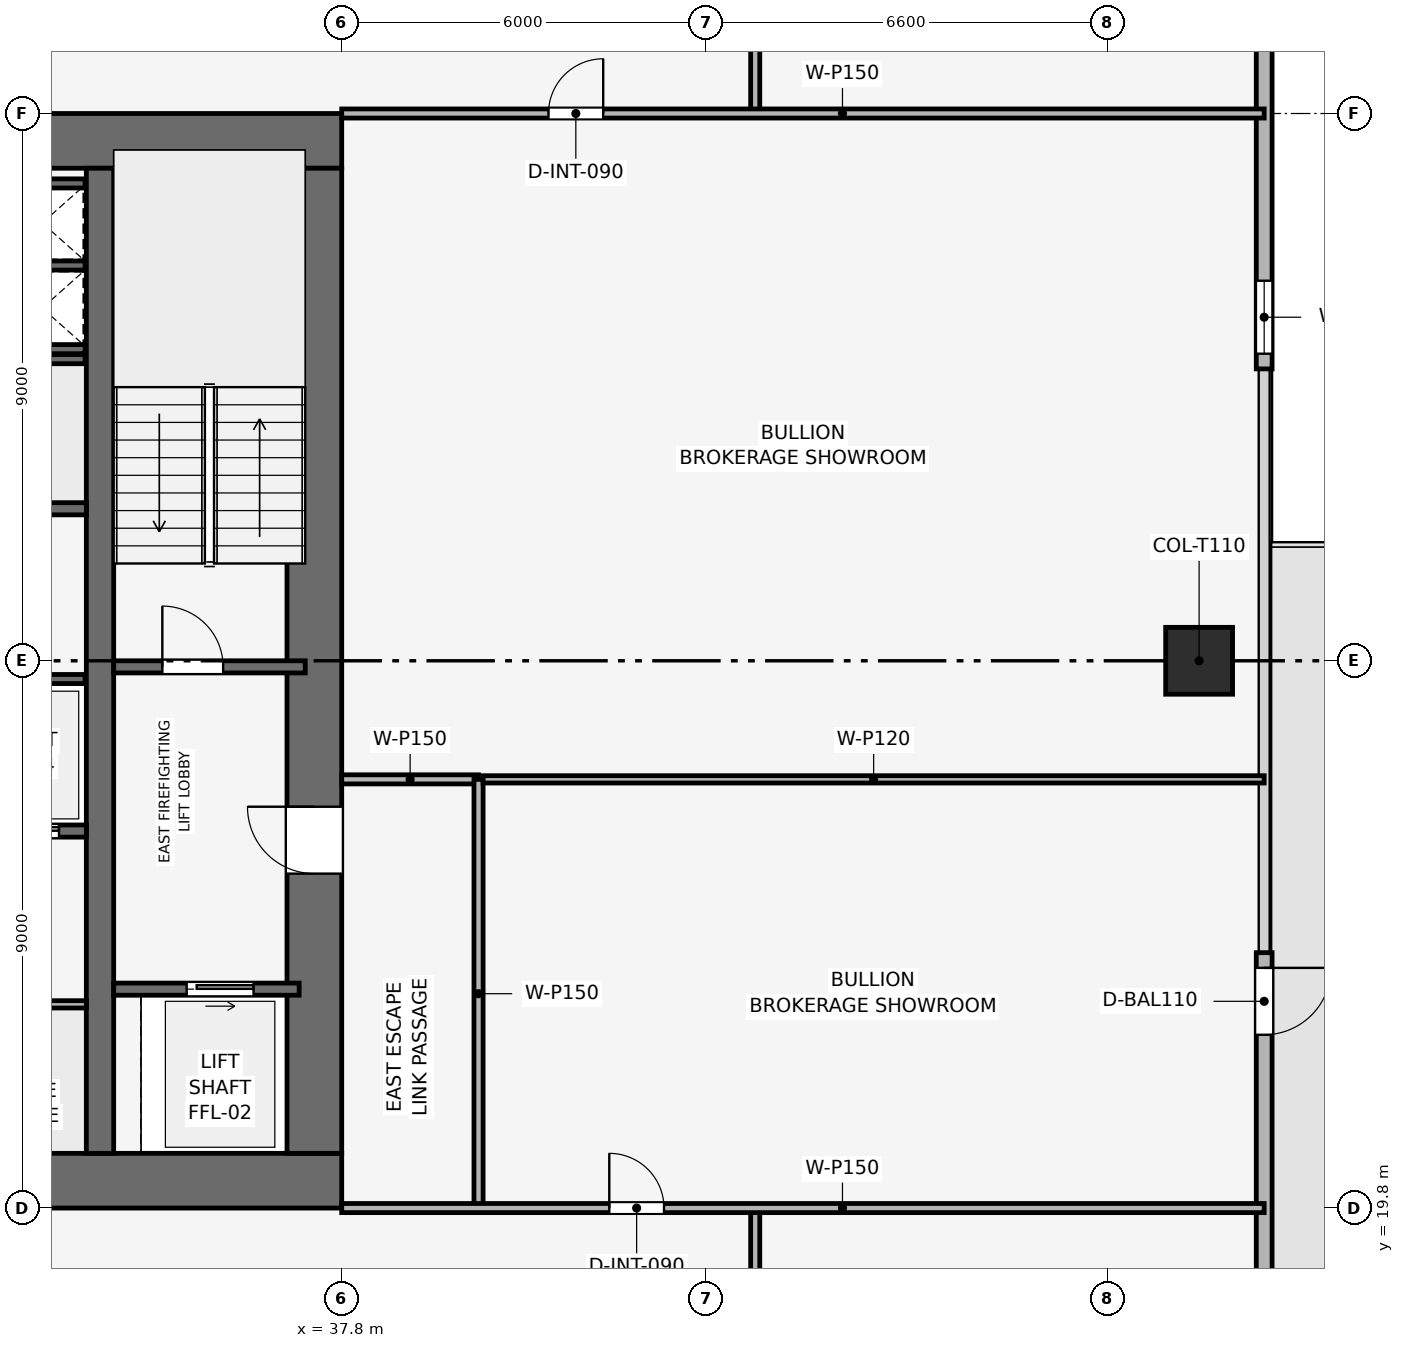
"""IFC4 building model, lengths in metres.
Left out: names, types, materials, properties, quantities, classifications, styles, units other than length and angle.
Written with IfcOpenShell. Run it as: python <this file> out.ifc"""

import sys

from ifc_helpers import new_model, si_unit, direction, frame, frame_2d, origin, origin_2d, place, context, subcontext, project, spatial, rectangle, extrude, element, fill, save


model = new_model("IFC4")
c1 = context("Model", 3, precision=1e-05, world=origin(), true_north=direction((0.0, 1.0)))
c2 = subcontext(c1, "Body", "Model", "MODEL_VIEW")
j1 = project(units=[si_unit("LENGTHUNIT", "METRE"), si_unit("PLANEANGLEUNIT", "RADIAN")], contexts=[c1])
p1 = place(None, origin())
s1 = spatial("IfcSite", under=j1, at=p1, CompositionType="ELEMENT")
p2 = place(p1, origin())
s2 = spatial("IfcBuilding", under=s1, at=p2, CompositionType="ELEMENT")
p3 = place(p2, frame((0.0, 0.0, 183.3)))
s3 = spatial("IfcBuildingStorey", under=s2, at=p3, CompositionType="ELEMENT", Elevation=183.3)
p4 = place(p3, frame((19.8, 20.25, 0.0), z_axis=(0.0, 0.0, 1.0), x_axis=(1.0, 0.0, 0.0)))
e1 = element("IfcWall", 1, at=p4, inside=s3, PredefinedType="SHEAR", context=c2, shape_type="SweptSolid", body=[
    extrude(rectangle(XDim=18.0, YDim=0.9, at=frame_2d((9.0, 0.0))), origin(), (0.0, 0.0, 1.0), 3.75),
])
p5 = place(p4, frame((8.4, 0.0, 0.0)))
e2 = element("IfcOpeningElement", 2, at=p5, cuts=e1, PredefinedType="OPENING", context=c2, shape_type="SweptSolid", body=[
    extrude(rectangle(XDim=1.2, YDim=2.2, at=frame_2d((0.6, 1.1))), frame((0.0, 0.46, 0.0), z_axis=(0.0, -1.0, 0.0), x_axis=(1.0, 0.0, 0.0)), (0.0, 0.0, 1.0), 0.92),
])
p6 = place(p3, frame((19.8, 37.35, 0.0), z_axis=(0.0, 0.0, 1.0), x_axis=(1.0, 0.0, 0.0)))
e3 = element("IfcWall", 3, at=p6, inside=s3, PredefinedType="SHEAR", context=c2, shape_type="SweptSolid", body=[
    extrude(rectangle(XDim=18.0, YDim=0.9, at=frame_2d((9.0, 0.0))), origin(), (0.0, 0.0, 1.0), 3.75),
])
p7 = place(p6, frame((7.05, 0.0, 0.0)))
e4 = element("IfcOpeningElement", 4, at=p7, cuts=e3, PredefinedType="OPENING", context=c2, shape_type="SweptSolid", body=[
    extrude(rectangle(XDim=1.1, YDim=2.15, at=frame_2d((0.55, 1.075))), frame((0.0, 0.46, 0.0), z_axis=(0.0, -1.0, 0.0), x_axis=(1.0, 0.0, 0.0)), (0.0, 0.0, 1.0), 0.92),
])
p8 = place(p3, frame((37.35, 20.7, 0.0), z_axis=(0.0, 0.0, 1.0), x_axis=(0.0, 1.0, 0.0)))
e5 = element("IfcWall", 5, at=p8, inside=s3, PredefinedType="SHEAR", context=c2, shape_type="SweptSolid", body=[
    extrude(rectangle(XDim=16.2, YDim=0.9, at=frame_2d((8.1, 0.0))), origin(), (0.0, 0.0, 1.0), 3.75),
])
p9 = place(p8, frame((4.6, 0.0, 0.0)))
e6 = element("IfcOpeningElement", 6, at=p9, cuts=e5, PredefinedType="OPENING", context=c2, shape_type="SweptSolid", body=[
    extrude(rectangle(XDim=1.1, YDim=2.15, at=frame_2d((0.55, 1.075))), frame((0.0, 0.46, 0.0), z_axis=(0.0, -1.0, 0.0), x_axis=(1.0, 0.0, 0.0)), (0.0, 0.0, 1.0), 0.92),
])
p10 = place(p3, frame((33.825, 20.7, 0.0), z_axis=(0.0, 0.0, 1.0), x_axis=(0.0, 1.0, 0.0)))
e7 = element("IfcWall", 7, at=p10, inside=s3, PredefinedType="SHEAR", context=c2, shape_type="SweptSolid", body=[
    extrude(rectangle(XDim=16.2, YDim=0.45, at=frame_2d((8.1, 0.0))), origin(), (0.0, 0.0, 1.0), 3.75),
])
p11 = place(p3, frame((51.9, 28.8, 0.003), z_axis=(0.0, 0.0, 1.0), x_axis=(1.0, 0.0, 0.0)))
e8 = element("IfcColumn", 8, at=p11, inside=s3, PredefinedType="COLUMN", context=c2, shape_type="SweptSolid", body=[
    extrude(rectangle(XDim=1.1, YDim=1.1, at=origin_2d()), origin(), (0.0, 0.0, 1.0), 3.489),
])
p12 = place(p3, frame((52.97, 46.2, 0.0), z_axis=(0.0, 0.0, 1.0), x_axis=(0.0, -1.0, 0.0)))
e9 = element("IfcWall", 9, at=p12, inside=s3, PredefinedType="SOLIDWALL", context=c2, shape_type="SweptSolid", body=[
    extrude(rectangle(XDim=12.6, YDim=0.26, at=frame_2d((6.3, 0.0))), origin(), (0.0, 0.0, 1.0), 3.495),
])
p13 = place(p12, frame((11.15, 0.0, 0.9)))
e10 = element("IfcOpeningElement", 10, at=p13, cuts=e9, PredefinedType="OPENING", context=c2, shape_type="SweptSolid", body=[
    extrude(rectangle(XDim=1.2, YDim=2.1, at=frame_2d((0.6, 1.05))), frame((0.0, 0.14, 0.0), z_axis=(0.0, -1.0, 0.0), x_axis=(1.0, 0.0, 0.0)), (0.0, 0.0, 1.0), 0.28),
])
p14 = place(p3, frame((52.97, 24.0, 0.0), z_axis=(0.0, 0.0, 1.0), x_axis=(0.0, -1.0, 0.0)))
e11 = element("IfcWall", 11, at=p14, inside=s3, PredefinedType="SOLIDWALL", context=c2, shape_type="SweptSolid", body=[
    extrude(rectangle(XDim=12.6, YDim=0.26, at=frame_2d((6.3, 0.0))), origin(), (0.0, 0.0, 1.0), 3.495),
])
p15 = place(p14, frame((0.25, 0.0, 0.0)))
e12 = element("IfcOpeningElement", 12, at=p15, cuts=e11, PredefinedType="OPENING", context=c2, shape_type="SweptSolid", body=[
    extrude(rectangle(XDim=1.1, YDim=2.2, at=frame_2d((0.55, 1.1))), frame((0.0, 0.14, 0.0), z_axis=(0.0, -1.0, 0.0), x_axis=(1.0, 0.0, 0.0)), (0.0, 0.0, 1.0), 0.28),
])
p16 = place(p3, frame((34.05, 28.7, 0.0), z_axis=(0.0, 0.0, 1.0), x_axis=(1.0, 0.0, 0.0)))
e13 = element("IfcWall", 13, at=p16, inside=s3, PredefinedType="SHEAR", context=c2, shape_type="SweptSolid", body=[
    extrude(rectangle(XDim=3.15, YDim=0.2, at=frame_2d((1.575, 0.0))), origin(), (0.0, 0.0, 1.0), 3.495),
])
p17 = place(p16, frame((0.8, 0.0, 0.0)))
e14 = element("IfcOpeningElement", 14, at=p17, cuts=e13, PredefinedType="OPENING", context=c2, shape_type="SweptSolid", body=[
    extrude(rectangle(XDim=1.0, YDim=2.1, at=frame_2d((0.5, 1.05))), frame((0.0, 0.11, 0.0), z_axis=(0.0, -1.0, 0.0), x_axis=(1.0, 0.0, 0.0)), (0.0, 0.0, 1.0), 0.22),
])
for number, where, z_axis, x_axis in (
    (15, (32.25, 33.925, 0.0), (0.0, 0.0, 1.0), (1.0, 0.0, 0.0)),
    (16, (32.25, 35.3, 0.0), (0.0, 0.0, 1.0), (1.0, 0.0, 0.0)),
):
    element("IfcWall", number, at=place(p3, frame(where, z_axis=z_axis, x_axis=x_axis)), inside=s3, PredefinedType="SHEAR", context=c2, shape_type="SweptSolid", body=[
        extrude(rectangle(XDim=1.33, YDim=0.15, at=frame_2d((0.665, 0.0))), origin(), (0.0, 0.0, 1.0), 3.495),
    ])
p18 = place(p3, frame((34.05, 23.4, 0.0), z_axis=(0.0, 0.0, 1.0), x_axis=(1.0, 0.0, 0.0)))
e17 = element("IfcWall", 17, at=p18, inside=s3, PredefinedType="SHEAR", context=c2, shape_type="SweptSolid", body=[
    extrude(rectangle(XDim=3.05, YDim=0.2, at=frame_2d((1.525, 0.0))), origin(), (0.0, 0.0, 1.0), 3.495),
])
p19 = place(p18, frame((1.2, 0.0, 0.0)))
e18 = element("IfcOpeningElement", 18, at=p19, cuts=e17, PredefinedType="OPENING", context=c2, shape_type="SweptSolid", body=[
    extrude(rectangle(XDim=1.1, YDim=2.15, at=frame_2d((0.55, 1.075))), frame((0.0, 0.11, 0.0), z_axis=(0.0, -1.0, 0.0), x_axis=(1.0, 0.0, 0.0)), (0.0, 0.0, 1.0), 0.22),
])
p20 = place(p3, frame((31.6, 26.0, 0.0), z_axis=(0.0, 0.0, 1.0), x_axis=(1.0, 0.0, 0.0)))
e19 = element("IfcWall", 19, at=p20, inside=s3, PredefinedType="SHEAR", context=c2, shape_type="SweptSolid", body=[
    extrude(rectangle(XDim=2.0, YDim=0.2, at=frame_2d((1.0, 0.0))), origin(), (0.0, 0.0, 1.0), 3.495),
])
p21 = place(p20, frame((0.45, 0.0, 0.0)))
e20 = element("IfcOpeningElement", 20, at=p21, cuts=e19, PredefinedType="OPENING", context=c2, shape_type="SweptSolid", body=[
    extrude(rectangle(XDim=1.1, YDim=2.15, at=frame_2d((0.55, 1.075))), frame((0.0, 0.11, 0.0), z_axis=(0.0, -1.0, 0.0), x_axis=(1.0, 0.0, 0.0)), (0.0, 0.0, 1.0), 0.22),
])
p22 = place(p3, frame((31.6, 31.3, 0.0), z_axis=(0.0, 0.0, 1.0), x_axis=(1.0, 0.0, 0.0)))
e21 = element("IfcWall", 21, at=p22, inside=s3, PredefinedType="SHEAR", context=c2, shape_type="SweptSolid", body=[
    extrude(rectangle(XDim=2.0, YDim=0.2, at=frame_2d((1.0, 0.0))), origin(), (0.0, 0.0, 1.0), 3.495),
])
p23 = place(p3, frame((32.25, 36.65, 0.0), z_axis=(0.0, 0.0, 1.0), x_axis=(1.0, 0.0, 0.0)))
e22 = element("IfcWall", 22, at=p23, inside=s3, PredefinedType="SHEAR", context=c2, shape_type="SweptSolid", body=[
    extrude(rectangle(XDim=1.33, YDim=0.15, at=frame_2d((0.665, 0.0))), origin(), (0.0, 0.0, 1.0), 3.495),
])
for number, where, z_axis, x_axis in (
    (23, (29.5, 28.5, 0.0), (0.0, 0.0, 1.0), (1.0, 0.0, 0.0)),
    (24, (29.5, 33.76, 0.0), (0.0, 0.0, 1.0), (1.0, 0.0, 0.0)),
):
    element("IfcWall", number, at=place(p3, frame(where, z_axis=z_axis, x_axis=x_axis)), inside=s3, PredefinedType="SHEAR", context=c2, shape_type="SweptSolid", body=[
        extrude(rectangle(XDim=4.08, YDim=0.15, at=frame_2d((2.04, 0.0))), origin(), (0.0, 0.0, 1.0), 3.495),
    ])
p24 = place(p3, frame((29.55, 23.15, 0.0), z_axis=(0.0, 0.0, 1.0), x_axis=(1.0, 0.0, 0.0)))
e25 = element("IfcWall", 25, at=p24, inside=s3, PredefinedType="PARTITIONING", context=c2, shape_type="SweptSolid", body=[
    extrude(rectangle(XDim=4.05, YDim=0.12, at=frame_2d((2.025, 0.0))), origin(), (0.0, 0.0, 1.0), 3.495),
])
p25 = place(p24, frame((1.575, 0.0, 0.0)))
e26 = element("IfcOpeningElement", 26, at=p25, cuts=e25, PredefinedType="OPENING", context=c2, shape_type="SweptSolid", body=[
    extrude(rectangle(XDim=0.9, YDim=2.1, at=frame_2d((0.45, 1.05))), frame((0.0, 0.07, 0.0), z_axis=(0.0, -1.0, 0.0), x_axis=(1.0, 0.0, 0.0)), (0.0, 0.0, 1.0), 0.14),
])
p26 = place(p3, frame((37.8, 26.85, 0.0), z_axis=(0.0, 0.0, 1.0), x_axis=(1.0, 0.0, 0.0)))
e27 = element("IfcWall", 27, at=p26, inside=s3, PredefinedType="PARTITIONING", context=c2, shape_type="SweptSolid", body=[
    extrude(rectangle(XDim=2.25, YDim=0.15, at=frame_2d((1.125, 0.0))), origin(), (0.0, 0.0, 1.0), 3.495),
])
p27 = place(p3, frame((40.05, 19.8, 0.0), z_axis=(0.0, 0.0, 1.0), x_axis=(0.0, 1.0, 0.0)))
e28 = element("IfcWall", 28, at=p27, inside=s3, PredefinedType="PARTITIONING", context=c2, shape_type="SweptSolid", body=[
    extrude(rectangle(XDim=7.05, YDim=0.15, at=frame_2d((3.525, 0.0))), origin(), (0.0, 0.0, 1.0), 3.03),
])
p28 = place(p3, frame((40.125, 26.85, 0.0), z_axis=(0.0, 0.0, 1.0), x_axis=(1.0, 0.0, 0.0)))
e29 = element("IfcWall", 29, at=p28, inside=s3, PredefinedType="PARTITIONING", context=c2, shape_type="SweptSolid", body=[
    extrude(rectangle(XDim=12.845, YDim=0.12, at=frame_2d((6.422, 0.0))), origin(), (0.0, 0.0, 1.0), 2.98),
])
p29 = place(p3, frame((44.6, 17.4, 0.0), z_axis=(0.0, 0.0, 1.0), x_axis=(0.0, 1.0, 0.0)))
e30 = element("IfcWall", 30, at=p29, inside=s3, PredefinedType="PARTITIONING", context=c2, shape_type="SweptSolid", body=[
    extrude(rectangle(XDim=2.4, YDim=0.15, at=frame_2d((1.2, 0.0))), origin(), (0.0, 0.0, 1.0), 3.495),
])
p30 = place(p3, frame((44.6, 37.8, 0.0), z_axis=(0.0, 0.0, 1.0), x_axis=(0.0, 1.0, 0.0)))
e31 = element("IfcWall", 31, at=p30, inside=s3, PredefinedType="PARTITIONING", context=c2, shape_type="SweptSolid", body=[
    extrude(rectangle(XDim=2.4, YDim=0.15, at=frame_2d((1.2, 0.0))), origin(), (0.0, 0.0, 1.0), 3.495),
])
p31 = place(p3, frame((37.8, 19.8, 0.0), z_axis=(0.0, 0.0, 1.0), x_axis=(1.0, 0.0, 0.0)))
e32 = element("IfcWall", 32, at=p31, inside=s3, PredefinedType="PARTITIONING", context=c2, shape_type="SweptSolid", body=[
    extrude(rectangle(XDim=15.17, YDim=0.15, at=frame_2d((7.585, 0.0))), origin(), (0.0, 0.0, 1.0), 2.98),
])
p32 = place(p31, frame((4.4, 0.0, 0.0)))
e33 = element("IfcOpeningElement", 33, at=p32, cuts=e32, PredefinedType="OPENING", context=c2, shape_type="SweptSolid", body=[
    extrude(rectangle(XDim=0.9, YDim=2.1, at=frame_2d((0.45, 1.05))), frame((0.0, 0.085, 0.0), z_axis=(0.0, -1.0, 0.0), x_axis=(1.0, 0.0, 0.0)), (0.0, 0.0, 1.0), 0.17),
])
p33 = place(p3, frame((37.8, 37.8, 0.0), z_axis=(0.0, 0.0, 1.0), x_axis=(1.0, 0.0, 0.0)))
e34 = element("IfcWall", 34, at=p33, inside=s3, PredefinedType="PARTITIONING", context=c2, shape_type="SweptSolid", body=[
    extrude(rectangle(XDim=15.17, YDim=0.15, at=frame_2d((7.585, 0.0))), origin(), (0.0, 0.0, 1.0), 2.98),
])
p34 = place(p33, frame((3.4, 0.0, 0.0)))
e35 = element("IfcOpeningElement", 35, at=p34, cuts=e34, PredefinedType="OPENING", context=c2, shape_type="SweptSolid", body=[
    extrude(rectangle(XDim=0.9, YDim=2.1, at=frame_2d((0.45, 1.05))), frame((0.0, 0.085, 0.0), z_axis=(0.0, -1.0, 0.0), x_axis=(1.0, 0.0, 0.0)), (0.0, 0.0, 1.0), 0.17),
])
p35 = place(p15, origin())
e36 = element("IfcDoor", 36, at=p35, inside=s3, OperationType="SINGLE_SWING_LEFT", PredefinedType="DOOR", context=c2, shape_type="SweptSolid", body=[
    extrude(rectangle(XDim=1.1, YDim=2.2, at=frame_2d((0.55, 1.1))), frame((0.0, 0.025, 0.0), z_axis=(0.0, -1.0, 0.0), x_axis=(1.0, 0.0, 0.0)), (0.0, 0.0, 1.0), 0.05),
])
fill(e12, e36)
p36 = place(p13, origin())
e37 = element("IfcWindow", 37, at=p36, inside=s3, PartitioningType="SINGLE_PANEL", PredefinedType="WINDOW", context=c2, shape_type="SweptSolid", body=[
    extrude(rectangle(XDim=1.2, YDim=2.1, at=frame_2d((0.6, 1.05))), frame((0.0, 0.03, 0.0), z_axis=(0.0, -1.0, 0.0), x_axis=(1.0, 0.0, 0.0)), (0.0, 0.0, 1.0), 0.06),
])
fill(e10, e37)
p37 = place(p17, origin())
e38 = element("IfcDoor", 38, at=p37, inside=s3, OperationType="SINGLE_SWING_LEFT", PredefinedType="DOOR", context=c2, shape_type="SweptSolid", body=[
    extrude(rectangle(XDim=1.0, YDim=2.1, at=frame_2d((0.5, 1.05))), frame((0.0, 0.025, 0.0), z_axis=(0.0, -1.0, 0.0), x_axis=(1.0, 0.0, 0.0)), (0.0, 0.0, 1.0), 0.05),
])
fill(e14, e38)
p38 = place(p19, origin())
e39 = element("IfcDoor", 39, at=p38, inside=s3, OperationType="SLIDING_TO_RIGHT", PredefinedType="DOOR", context=c2, shape_type="SweptSolid", body=[
    extrude(rectangle(XDim=1.1, YDim=2.15, at=frame_2d((0.55, 1.075))), frame((0.0, 0.025, 0.0), z_axis=(0.0, -1.0, 0.0), x_axis=(1.0, 0.0, 0.0)), (0.0, 0.0, 1.0), 0.05),
])
fill(e18, e39)
p39 = place(p21, origin())
e40 = element("IfcDoor", 40, at=p39, inside=s3, OperationType="SLIDING_TO_RIGHT", PredefinedType="DOOR", context=c2, shape_type="SweptSolid", body=[
    extrude(rectangle(XDim=1.1, YDim=2.15, at=frame_2d((0.55, 1.075))), frame((0.0, 0.025, 0.0), z_axis=(0.0, -1.0, 0.0), x_axis=(1.0, 0.0, 0.0)), (0.0, 0.0, 1.0), 0.05),
])
fill(e20, e40)
p40 = place(p32, origin())
e41 = element("IfcDoor", 41, at=p40, inside=s3, OperationType="SINGLE_SWING_LEFT", PredefinedType="DOOR", context=c2, shape_type="SweptSolid", body=[
    extrude(rectangle(XDim=0.9, YDim=2.1, at=frame_2d((0.45, 1.05))), frame((0.0, 0.025, 0.0), z_axis=(0.0, -1.0, 0.0), x_axis=(1.0, 0.0, 0.0)), (0.0, 0.0, 1.0), 0.05),
])
fill(e33, e41)
p41 = place(p34, origin())
e42 = element("IfcDoor", 42, at=p41, inside=s3, OperationType="SINGLE_SWING_RIGHT", PredefinedType="DOOR", context=c2, shape_type="SweptSolid", body=[
    extrude(rectangle(XDim=0.9, YDim=2.1, at=frame_2d((0.45, 1.05))), frame((0.0, 0.025, 0.0), z_axis=(0.0, -1.0, 0.0), x_axis=(1.0, 0.0, 0.0)), (0.0, 0.0, 1.0), 0.05),
])
fill(e35, e42)
p42 = place(p9, origin())
e43 = element("IfcDoor", 43, at=p42, inside=s3, OperationType="SINGLE_SWING_RIGHT", PredefinedType="DOOR", context=c2, shape_type="SweptSolid", body=[
    extrude(rectangle(XDim=1.1, YDim=2.15, at=frame_2d((0.55, 1.075))), frame((0.0, 0.025, 0.0), z_axis=(0.0, -1.0, 0.0), x_axis=(1.0, 0.0, 0.0)), (0.0, 0.0, 1.0), 0.05),
])
fill(e6, e43)
save(model, sys.argv[1])
